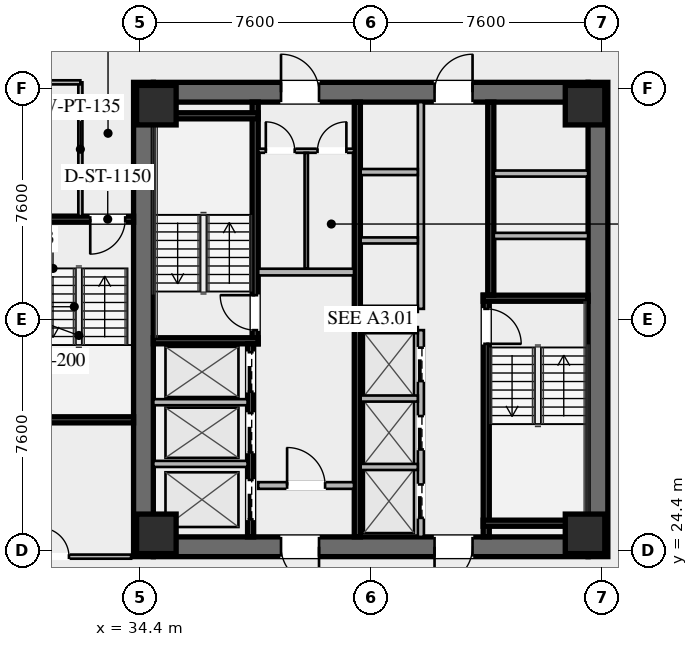
"""IFC4 building model, lengths in metres.
Left out: names, types, materials, properties, quantities, classifications, styles, units other than length and angle.
Written with IfcOpenShell. Run it as: python <this file> out.ifc"""

import sys

from ifc_helpers import new_model, si_unit, direction, frame, frame_2d, origin, origin_2d, place, context, subcontext, project, spatial, rectangle, hollow_rectangle, extrude, element, fill, save


model = new_model("IFC4")
c1 = context("Model", 3, precision=1e-05, world=origin(), true_north=direction((0.0, 1.0)))
c2 = subcontext(c1, "Body", "Model", "MODEL_VIEW")
j1 = project(units=[si_unit("LENGTHUNIT", "METRE"), si_unit("PLANEANGLEUNIT", "RADIAN")], contexts=[c1])
p1 = place(None, origin())
s1 = spatial("IfcSite", under=j1, at=p1, CompositionType="ELEMENT")
p2 = place(p1, origin())
s2 = spatial("IfcBuilding", under=s1, at=p2, CompositionType="ELEMENT")
p3 = place(p2, frame((0.0, 0.0, 67.2)))
s3 = spatial("IfcBuildingStorey", under=s2, at=p3, CompositionType="ELEMENT", Elevation=67.2)
for number, where, z_axis, x_axis in (
    (1, (34.525, 24.2, 0.0), (0.0, 0.0, 1.0), (0.0, 1.0, 0.0)),
    (2, (49.475, 39.8, 0.0), (0.0, 0.0, 1.0), (0.0, -1.0, 0.0)),
):
    element("IfcWall", number, at=place(p3, frame(where, z_axis=z_axis, x_axis=x_axis)), inside=s3, PredefinedType="SHEAR", context=c2, shape_type="SweptSolid", body=[
        extrude(rectangle(XDim=15.6, YDim=0.65, at=frame_2d((7.8, 0.0))), origin(), (0.0, 0.0, 1.0), 3.55),
    ])
p4 = place(p3, frame((49.15, 24.525, 0.0), z_axis=(0.0, 0.0, 1.0), x_axis=(-1.0, 0.0, 0.0)))
e3 = element("IfcWall", 3, at=p4, inside=s3, PredefinedType="SHEAR", context=c2, shape_type="SweptSolid", body=[
    extrude(rectangle(XDim=14.3, YDim=0.65, at=frame_2d((7.15, 0.0))), origin(), (0.0, 0.0, 1.0), 3.55),
])
p5 = place(p4, frame((8.85, 0.0, 0.0)))
e4 = element("IfcOpeningElement", 4, at=p5, cuts=e3, PredefinedType="OPENING", context=c2, shape_type="SweptSolid", body=[
    extrude(rectangle(XDim=1.25, YDim=2.25, at=frame_2d((0.625, 1.125))), frame((0.0, 0.335, 0.0), z_axis=(0.0, -1.0, 0.0), x_axis=(1.0, 0.0, 0.0)), (0.0, 0.0, 1.0), 0.67),
])
p6 = place(p4, frame((3.8, 0.0, 0.0)))
e5 = element("IfcOpeningElement", 5, at=p6, cuts=e3, PredefinedType="OPENING", context=c2, shape_type="SweptSolid", body=[
    extrude(rectangle(XDim=1.25, YDim=2.25, at=frame_2d((0.625, 1.125))), frame((0.0, 0.335, 0.0), z_axis=(0.0, -1.0, 0.0), x_axis=(1.0, 0.0, 0.0)), (0.0, 0.0, 1.0), 0.67),
])
p7 = place(p3, frame((34.85, 39.475, 0.0), z_axis=(0.0, 0.0, 1.0), x_axis=(1.0, 0.0, 0.0)))
e6 = element("IfcWall", 6, at=p7, inside=s3, PredefinedType="SHEAR", context=c2, shape_type="SweptSolid", body=[
    extrude(rectangle(XDim=14.3, YDim=0.65, at=frame_2d((7.15, 0.0))), origin(), (0.0, 0.0, 1.0), 3.55),
])
p8 = place(p7, frame((4.2, 0.0, 0.0)))
e7 = element("IfcOpeningElement", 7, at=p8, cuts=e6, PredefinedType="OPENING", context=c2, shape_type="SweptSolid", body=[
    extrude(rectangle(XDim=1.25, YDim=2.25, at=frame_2d((0.625, 1.125))), frame((0.0, 0.335, 0.0), z_axis=(0.0, -1.0, 0.0), x_axis=(1.0, 0.0, 0.0)), (0.0, 0.0, 1.0), 0.67),
])
p9 = place(p7, frame((9.25, 0.0, 0.0)))
e8 = element("IfcOpeningElement", 8, at=p9, cuts=e6, PredefinedType="OPENING", context=c2, shape_type="SweptSolid", body=[
    extrude(rectangle(XDim=1.25, YDim=2.25, at=frame_2d((0.625, 1.125))), frame((0.0, 0.335, 0.0), z_axis=(0.0, -1.0, 0.0), x_axis=(1.0, 0.0, 0.0)), (0.0, 0.0, 1.0), 0.67),
])
for number, where, z_axis, x_axis in (
    (9, (34.95, 24.95, 0.0), (0.0, 0.0, 1.0), (1.0, 0.0, 0.0)),
    (10, (49.05, 24.95, 0.0), (0.0, 0.0, 1.0), (1.0, 0.0, 0.0)),
    (11, (49.05, 39.05, 0.0), (0.0, 0.0, 1.0), (1.0, 0.0, 0.0)),
    (12, (34.95, 39.05, 0.0), (0.0, 0.0, 1.0), (1.0, 0.0, 0.0)),
):
    element("IfcColumn", number, at=place(p3, frame(where, z_axis=z_axis, x_axis=x_axis)), inside=s3, PredefinedType="COLUMN", context=c2, shape_type="SweptSolid", body=[
        extrude(hollow_rectangle(XDim=1.3, YDim=1.3, WallThickness=0.05, at=origin_2d()), origin(), (0.0, 0.0, 1.0), 3.35),
    ])
p10 = place(p3, frame((38.2, 31.2, 0.0), z_axis=(0.0, 0.0, 1.0), x_axis=(0.0, 1.0, 0.0)))
e13 = element("IfcWall", 13, at=p10, inside=s3, PredefinedType="SHEAR", context=c2, shape_type="SweptSolid", body=[
    extrude(rectangle(XDim=7.95, YDim=0.2, at=frame_2d((3.975, 0.0))), origin(), (0.0, 0.0, 1.0), 3.35),
])
p11 = place(p10, frame((0.45, 0.0, 0.0)))
e14 = element("IfcOpeningElement", 14, at=p11, cuts=e13, PredefinedType="OPENING", context=c2, shape_type="SweptSolid", body=[
    extrude(rectangle(XDim=1.15, YDim=2.2, at=frame_2d((0.575, 1.1))), frame((0.0, 0.11, 0.0), z_axis=(0.0, -1.0, 0.0), x_axis=(1.0, 0.0, 0.0)), (0.0, 0.0, 1.0), 0.22),
])
for number, where, z_axis, x_axis in (
    (15, (34.85, 31.3, 0.0), (0.0, 0.0, 1.0), (1.0, 0.0, 0.0)),
    (16, (34.85, 38.7, 0.0), (0.0, 0.0, 1.0), (1.0, 0.0, 0.0)),
):
    element("IfcWall", number, at=place(p3, frame(where, z_axis=z_axis, x_axis=x_axis)), inside=s3, PredefinedType="SHEAR", context=c2, shape_type="SweptSolid", body=[
        extrude(rectangle(XDim=3.45, YDim=0.2, at=frame_2d((1.725, 0.0))), origin(), (0.0, 0.0, 1.0), 3.35),
    ])
p12 = place(p3, frame((45.8, 32.8, 0.0), z_axis=(0.0, 0.0, 1.0), x_axis=(0.0, -1.0, 0.0)))
e17 = element("IfcWall", 17, at=p12, inside=s3, PredefinedType="SHEAR", context=c2, shape_type="SweptSolid", body=[
    extrude(rectangle(XDim=7.95, YDim=0.2, at=frame_2d((3.975, 0.0))), origin(), (0.0, 0.0, 1.0), 3.35),
])
p13 = place(p12, frame((0.45, 0.0, 0.0)))
e18 = element("IfcOpeningElement", 18, at=p13, cuts=e17, PredefinedType="OPENING", context=c2, shape_type="SweptSolid", body=[
    extrude(rectangle(XDim=1.15, YDim=2.2, at=frame_2d((0.575, 1.1))), frame((0.0, 0.11, 0.0), z_axis=(0.0, -1.0, 0.0), x_axis=(1.0, 0.0, 0.0)), (0.0, 0.0, 1.0), 0.22),
])
for number, where, z_axis, x_axis in (
    (19, (45.7, 32.7, 0.0), (0.0, 0.0, 1.0), (1.0, 0.0, 0.0)),
    (20, (45.7, 25.3, 0.0), (0.0, 0.0, 1.0), (1.0, 0.0, 0.0)),
):
    element("IfcWall", number, at=place(p3, frame(where, z_axis=z_axis, x_axis=x_axis)), inside=s3, PredefinedType="SHEAR", context=c2, shape_type="SweptSolid", body=[
        extrude(rectangle(XDim=3.45, YDim=0.2, at=frame_2d((1.725, 0.0))), origin(), (0.0, 0.0, 1.0), 3.35),
    ])
p14 = place(p3, frame((41.56, 24.85, 0.0), z_axis=(0.0, 0.0, 1.0), x_axis=(0.0, 1.0, 0.0)))
e21 = element("IfcWall", 21, at=p14, inside=s3, PredefinedType="SHEAR", context=c2, shape_type="SweptSolid", body=[
    extrude(rectangle(XDim=14.3, YDim=0.2, at=frame_2d((7.15, 0.0))), origin(), (0.0, 0.0, 1.0), 3.35),
])
p15 = place(p3, frame((38.3, 33.56, 0.0), z_axis=(0.0, 0.0, 1.0), x_axis=(1.0, 0.0, 0.0)))
e22 = element("IfcWall", 22, at=p15, inside=s3, PredefinedType="SOLIDWALL", context=c2, shape_type="SweptSolid", body=[
    extrude(rectangle(XDim=3.15, YDim=0.22, at=frame_2d((1.575, 0.0))), origin(), (0.0, 0.0, 1.0), 2.703),
])
p16 = place(p3, frame((38.3, 26.54, 0.0), z_axis=(0.0, 0.0, 1.0), x_axis=(1.0, 0.0, 0.0)))
e23 = element("IfcWall", 23, at=p16, inside=s3, PredefinedType="SOLIDWALL", context=c2, shape_type="SweptSolid", body=[
    extrude(rectangle(XDim=3.15, YDim=0.22, at=frame_2d((1.575, 0.0))), origin(), (0.0, 0.0, 1.0), 2.703),
])
p17 = place(p16, frame((0.95, 0.0, 0.0)))
e24 = element("IfcOpeningElement", 24, at=p17, cuts=e23, PredefinedType="OPENING", context=c2, shape_type="SweptSolid", body=[
    extrude(rectangle(XDim=1.25, YDim=2.25, at=frame_2d((0.625, 1.125))), frame((0.0, 0.12, 0.0), z_axis=(0.0, -1.0, 0.0), x_axis=(1.0, 0.0, 0.0)), (0.0, 0.0, 1.0), 0.24),
])
p18 = place(p3, frame((38.05, 24.85, 0.0), z_axis=(0.0, 0.0, 1.0), x_axis=(0.0, 1.0, 0.0)))
e25 = element("IfcWall", 25, at=p18, inside=s3, PredefinedType="SHEAR", context=c2, shape_type="SweptSolid", body=[
    extrude(rectangle(XDim=6.35, YDim=0.2, at=frame_2d((3.175, 0.0))), origin(), (0.0, 0.0, 1.0), 3.35),
])
p19 = place(p18, frame((4.775, 0.0, 0.0)))
e26 = element("IfcOpeningElement", 26, at=p19, cuts=e25, PredefinedType="OPENING", context=c2, shape_type="SweptSolid", body=[
    extrude(rectangle(XDim=1.3, YDim=2.25, at=frame_2d((0.65, 1.125))), frame((0.0, 0.11, 0.0), z_axis=(0.0, -1.0, 0.0), x_axis=(1.0, 0.0, 0.0)), (0.0, 0.0, 1.0), 0.22),
])
p20 = place(p18, frame((2.775, 0.0, 0.0)))
e27 = element("IfcOpeningElement", 27, at=p20, cuts=e25, PredefinedType="OPENING", context=c2, shape_type="SweptSolid", body=[
    extrude(rectangle(XDim=1.3, YDim=2.25, at=frame_2d((0.65, 1.125))), frame((0.0, 0.11, 0.0), z_axis=(0.0, -1.0, 0.0), x_axis=(1.0, 0.0, 0.0)), (0.0, 0.0, 1.0), 0.22),
])
p21 = place(p18, frame((0.575, 0.0, 0.0)))
e28 = element("IfcOpeningElement", 28, at=p21, cuts=e25, PredefinedType="OPENING", context=c2, shape_type="SweptSolid", body=[
    extrude(rectangle(XDim=1.3, YDim=2.25, at=frame_2d((0.65, 1.125))), frame((0.0, 0.11, 0.0), z_axis=(0.0, -1.0, 0.0), x_axis=(1.0, 0.0, 0.0)), (0.0, 0.0, 1.0), 0.22),
])
for number, where, z_axis, x_axis in (
    (29, (34.85, 27.25, 0.0), (0.0, 0.0, 1.0), (1.0, 0.0, 0.0)),
    (30, (34.85, 29.28, 0.0), (0.0, 0.0, 1.0), (1.0, 0.0, 0.0)),
):
    element("IfcWall", number, at=place(p3, frame(where, z_axis=z_axis, x_axis=x_axis)), inside=s3, PredefinedType="SOLIDWALL", context=c2, shape_type="SweptSolid", body=[
        extrude(rectangle(XDim=3.1, YDim=0.2, at=frame_2d((1.55, 0.0))), origin(), (0.0, 0.0, 1.0), 3.35),
    ])
p22 = place(p3, frame((45.95, 39.15, 0.0), z_axis=(0.0, 0.0, 1.0), x_axis=(0.0, -1.0, 0.0)))
e31 = element("IfcWall", 31, at=p22, inside=s3, PredefinedType="SHEAR", context=c2, shape_type="SweptSolid", body=[
    extrude(rectangle(XDim=6.35, YDim=0.2, at=frame_2d((3.175, 0.0))), origin(), (0.0, 0.0, 1.0), 3.35),
])
for number, where, z_axis, x_axis in (
    (32, (46.05, 34.75, 0.0), (0.0, 0.0, 1.0), (1.0, 0.0, 0.0)),
    (33, (46.05, 36.8, 0.0), (0.0, 0.0, 1.0), (1.0, 0.0, 0.0)),
):
    element("IfcWall", number, at=place(p3, frame(where, z_axis=z_axis, x_axis=x_axis)), inside=s3, PredefinedType="SOLIDWALL", context=c2, shape_type="SweptSolid", body=[
        extrude(rectangle(XDim=3.1, YDim=0.2, at=frame_2d((1.55, 0.0))), origin(), (0.0, 0.0, 1.0), 3.35),
    ])
p23 = place(p3, frame((38.3, 37.55, 0.0), z_axis=(0.0, 0.0, 1.0), x_axis=(1.0, 0.0, 0.0)))
e34 = element("IfcWall", 34, at=p23, inside=s3, PredefinedType="PARTITIONING", context=c2, shape_type="SweptSolid", body=[
    extrude(rectangle(XDim=3.15, YDim=0.135, at=frame_2d((1.575, 0.0))), origin(), (0.0, 0.0, 1.0), 2.703),
])
p24 = place(p23, frame((0.25, 0.0, 0.0)))
e35 = element("IfcOpeningElement", 35, at=p24, cuts=e34, PredefinedType="OPENING", context=c2, shape_type="SweptSolid", body=[
    extrude(rectangle(XDim=0.95, YDim=2.05, at=frame_2d((0.475, 1.025))), frame((0.0, 0.077, 0.0), z_axis=(0.0, -1.0, 0.0), x_axis=(1.0, 0.0, 0.0)), (0.0, 0.0, 1.0), 0.155),
])
p25 = place(p23, frame((1.95, 0.0, 0.0)))
e36 = element("IfcOpeningElement", 36, at=p25, cuts=e34, PredefinedType="OPENING", context=c2, shape_type="SweptSolid", body=[
    extrude(rectangle(XDim=0.95, YDim=2.05, at=frame_2d((0.475, 1.025))), frame((0.0, 0.077, 0.0), z_axis=(0.0, -1.0, 0.0), x_axis=(1.0, 0.0, 0.0)), (0.0, 0.0, 1.0), 0.155),
])
p26 = place(p3, frame((39.88, 33.68, 0.0), z_axis=(0.0, 0.0, 1.0), x_axis=(0.0, 1.0, 0.0)))
e37 = element("IfcWall", 37, at=p26, inside=s3, PredefinedType="PARTITIONING", context=c2, shape_type="SweptSolid", body=[
    extrude(rectangle(XDim=3.8, YDim=0.11, at=frame_2d((1.9, 0.0))), origin(), (0.0, 0.0, 1.0), 2.703),
])
p27 = place(p3, frame((43.65, 24.85, 0.0), z_axis=(0.0, 0.0, 1.0), x_axis=(0.0, 1.0, 0.0)))
e38 = element("IfcWall", 38, at=p27, inside=s3, PredefinedType="SOLIDWALL", context=c2, shape_type="SweptSolid", body=[
    extrude(rectangle(XDim=6.8, YDim=0.2, at=frame_2d((3.4, 0.0))), origin(), (0.0, 0.0, 1.0), 3.35),
])
p28 = place(p27, frame((0.625, 0.0, 0.0)))
e39 = element("IfcOpeningElement", 39, at=p28, cuts=e38, PredefinedType="OPENING", context=c2, shape_type="SweptSolid", body=[
    extrude(rectangle(XDim=1.1, YDim=2.2, at=frame_2d((0.55, 1.1))), frame((0.0, 0.11, 0.0), z_axis=(0.0, -1.0, 0.0), x_axis=(1.0, 0.0, 0.0)), (0.0, 0.0, 1.0), 0.22),
])
p29 = place(p27, frame((2.875, 0.0, 0.0)))
e40 = element("IfcOpeningElement", 40, at=p29, cuts=e38, PredefinedType="OPENING", context=c2, shape_type="SweptSolid", body=[
    extrude(rectangle(XDim=1.1, YDim=2.2, at=frame_2d((0.55, 1.1))), frame((0.0, 0.11, 0.0), z_axis=(0.0, -1.0, 0.0), x_axis=(1.0, 0.0, 0.0)), (0.0, 0.0, 1.0), 0.22),
])
p30 = place(p27, frame((5.125, 0.0, 0.0)))
e41 = element("IfcOpeningElement", 41, at=p30, cuts=e38, PredefinedType="OPENING", context=c2, shape_type="SweptSolid", body=[
    extrude(rectangle(XDim=1.1, YDim=2.2, at=frame_2d((0.55, 1.1))), frame((0.0, 0.11, 0.0), z_axis=(0.0, -1.0, 0.0), x_axis=(1.0, 0.0, 0.0)), (0.0, 0.0, 1.0), 0.22),
])
for number, where, z_axis, x_axis in (
    (42, (41.67, 27.15, 0.0), (0.0, 0.0, 1.0), (1.0, 0.0, 0.0)),
    (43, (41.67, 29.4, 0.0), (0.0, 0.0, 1.0), (1.0, 0.0, 0.0)),
    (44, (41.67, 31.65, 0.0), (0.0, 0.0, 1.0), (1.0, 0.0, 0.0)),
):
    element("IfcWall", number, at=place(p3, frame(where, z_axis=z_axis, x_axis=x_axis)), inside=s3, PredefinedType="SOLIDWALL", context=c2, shape_type="SweptSolid", body=[
        extrude(rectangle(XDim=1.88, YDim=0.2, at=frame_2d((0.94, 0.0))), origin(), (0.0, 0.0, 1.0), 3.35),
    ])
p31 = place(p3, frame((43.65, 32.35, 0.0), z_axis=(0.0, 0.0, 1.0), x_axis=(0.0, 1.0, 0.0)))
e45 = element("IfcWall", 45, at=p31, inside=s3, PredefinedType="SOLIDWALL", context=c2, shape_type="SweptSolid", body=[
    extrude(rectangle(XDim=6.8, YDim=0.2, at=frame_2d((3.4, 0.0))), origin(), (0.0, 0.0, 1.0), 3.35),
])
for number, where, z_axis, x_axis in (
    (46, (41.67, 32.35, 0.0), (0.0, 0.0, 1.0), (1.0, 0.0, 0.0)),
    (47, (41.67, 34.6, 0.0), (0.0, 0.0, 1.0), (1.0, 0.0, 0.0)),
    (48, (41.67, 36.85, 0.0), (0.0, 0.0, 1.0), (1.0, 0.0, 0.0)),
):
    element("IfcWall", number, at=place(p3, frame(where, z_axis=z_axis, x_axis=x_axis)), inside=s3, PredefinedType="SOLIDWALL", context=c2, shape_type="SweptSolid", body=[
        extrude(rectangle(XDim=1.88, YDim=0.2, at=frame_2d((0.94, 0.0))), origin(), (0.0, 0.0, 1.0), 3.35),
    ])
p32 = place(p3, frame((34.2, 35.3, 0.0), z_axis=(0.0, 0.0, 1.0), x_axis=(-1.0, 0.0, 0.0)))
e49 = element("IfcWall", 49, at=p32, inside=s3, PredefinedType="SHEAR", context=c2, shape_type="SweptSolid", body=[
    extrude(rectangle(XDim=3.4, YDim=0.2, at=frame_2d((1.7, 0.0))), origin(), (0.0, 0.0, 1.0), 3.35),
])
p33 = place(p32, frame((0.275, 0.0, 0.0)))
e50 = element("IfcOpeningElement", 50, at=p33, cuts=e49, PredefinedType="OPENING", context=c2, shape_type="SweptSolid", body=[
    extrude(rectangle(XDim=1.15, YDim=2.2, at=frame_2d((0.575, 1.1))), frame((0.0, 0.11, 0.0), z_axis=(0.0, -1.0, 0.0), x_axis=(1.0, 0.0, 0.0)), (0.0, 0.0, 1.0), 0.22),
])
p34 = place(p3, frame((30.8, 28.7, 0.0), z_axis=(0.0, 0.0, 1.0), x_axis=(1.0, 0.0, 0.0)))
e51 = element("IfcWall", 51, at=p34, inside=s3, PredefinedType="SHEAR", context=c2, shape_type="SweptSolid", body=[
    extrude(rectangle(XDim=3.4, YDim=0.2, at=frame_2d((1.7, 0.0))), origin(), (0.0, 0.0, 1.0), 3.35),
])
p35 = place(p3, frame((32.45, 35.4, 0.0), z_axis=(0.0, 0.0, 1.0), x_axis=(0.0, 1.0, 0.0)))
e52 = element("IfcWall", 52, at=p35, inside=s3, PredefinedType="PARTITIONING", context=c2, shape_type="SweptSolid", body=[
    extrude(rectangle(XDim=4.4, YDim=0.135, at=frame_2d((2.2, 0.0))), origin(), (0.0, 0.0, 1.0), 2.703),
])
p36 = place(p3, frame((32.45, 39.8, 0.0), z_axis=(0.0, 0.0, 1.0), x_axis=(-1.0, 0.0, 0.0)))
e53 = element("IfcWall", 53, at=p36, inside=s3, PredefinedType="PARTITIONING", context=c2, shape_type="SweptSolid", body=[
    extrude(rectangle(XDim=11.43, YDim=0.135, at=frame_2d((5.715, 0.0))), origin(), (0.0, 0.0, 1.0), 2.703),
])
p37 = place(p36, frame((4.89, 0.0, 0.0)))
e54 = element("IfcOpeningElement", 54, at=p37, cuts=e53, PredefinedType="OPENING", context=c2, shape_type="SweptSolid", body=[
    extrude(rectangle(XDim=0.95, YDim=2.05, at=frame_2d((0.475, 1.025))), frame((0.0, 0.077, 0.0), z_axis=(0.0, -1.0, 0.0), x_axis=(1.0, 0.0, 0.0)), (0.0, 0.0, 1.0), 0.155),
])
p38 = place(p3, frame((21.02, 24.2, 0.0), z_axis=(0.0, 0.0, 1.0), x_axis=(1.0, 0.0, 0.0)))
e55 = element("IfcWall", 55, at=p38, inside=s3, PredefinedType="PARTITIONING", context=c2, shape_type="SweptSolid", body=[
    extrude(rectangle(XDim=13.1, YDim=0.135, at=frame_2d((6.55, 0.0))), origin(), (0.0, 0.0, 1.0), 2.703),
])
p39 = place(p38, frame((10.105, 0.0, 0.0)))
e56 = element("IfcOpeningElement", 56, at=p39, cuts=e55, PredefinedType="OPENING", context=c2, shape_type="SweptSolid", body=[
    extrude(rectangle(XDim=0.95, YDim=2.05, at=frame_2d((0.475, 1.025))), frame((0.0, 0.077, 0.0), z_axis=(0.0, -1.0, 0.0), x_axis=(1.0, 0.0, 0.0)), (0.0, 0.0, 1.0), 0.155),
])
p40 = place(p8, origin())
e57 = element("IfcDoor", 57, at=p40, inside=s3, OperationType="SINGLE_SWING_LEFT", PredefinedType="DOOR", context=c2, shape_type="SweptSolid", body=[
    extrude(rectangle(XDim=1.25, YDim=2.25, at=frame_2d((0.625, 1.125))), frame((0.0, 0.025, 0.0), z_axis=(0.0, -1.0, 0.0), x_axis=(1.0, 0.0, 0.0)), (0.0, 0.0, 1.0), 0.05),
])
fill(e7, e57)
p41 = place(p9, origin())
e58 = element("IfcDoor", 58, at=p41, inside=s3, OperationType="SINGLE_SWING_RIGHT", PredefinedType="DOOR", context=c2, shape_type="SweptSolid", body=[
    extrude(rectangle(XDim=1.25, YDim=2.25, at=frame_2d((0.625, 1.125))), frame((0.0, 0.025, 0.0), z_axis=(0.0, -1.0, 0.0), x_axis=(1.0, 0.0, 0.0)), (0.0, 0.0, 1.0), 0.05),
])
fill(e8, e58)
p42 = place(p5, origin())
e59 = element("IfcDoor", 59, at=p42, inside=s3, OperationType="SINGLE_SWING_LEFT", PredefinedType="DOOR", context=c2, shape_type="SweptSolid", body=[
    extrude(rectangle(XDim=1.25, YDim=2.25, at=frame_2d((0.625, 1.125))), frame((0.0, 0.025, 0.0), z_axis=(0.0, -1.0, 0.0), x_axis=(1.0, 0.0, 0.0)), (0.0, 0.0, 1.0), 0.05),
])
fill(e4, e59)
p43 = place(p6, origin())
e60 = element("IfcDoor", 60, at=p43, inside=s3, OperationType="SINGLE_SWING_RIGHT", PredefinedType="DOOR", context=c2, shape_type="SweptSolid", body=[
    extrude(rectangle(XDim=1.25, YDim=2.25, at=frame_2d((0.625, 1.125))), frame((0.0, 0.025, 0.0), z_axis=(0.0, -1.0, 0.0), x_axis=(1.0, 0.0, 0.0)), (0.0, 0.0, 1.0), 0.05),
])
fill(e5, e60)
p44 = place(p11, origin())
e61 = element("IfcDoor", 61, at=p44, inside=s3, OperationType="SINGLE_SWING_RIGHT", PredefinedType="DOOR", context=c2, shape_type="SweptSolid", body=[
    extrude(rectangle(XDim=1.15, YDim=2.2, at=frame_2d((0.575, 1.1))), frame((0.0, 0.025, 0.0), z_axis=(0.0, -1.0, 0.0), x_axis=(1.0, 0.0, 0.0)), (0.0, 0.0, 1.0), 0.05),
])
fill(e14, e61)
p45 = place(p13, origin())
e62 = element("IfcDoor", 62, at=p45, inside=s3, OperationType="SINGLE_SWING_RIGHT", PredefinedType="DOOR", context=c2, shape_type="SweptSolid", body=[
    extrude(rectangle(XDim=1.15, YDim=2.2, at=frame_2d((0.575, 1.1))), frame((0.0, 0.025, 0.0), z_axis=(0.0, -1.0, 0.0), x_axis=(1.0, 0.0, 0.0)), (0.0, 0.0, 1.0), 0.05),
])
fill(e18, e62)
p46 = place(p17, origin())
e63 = element("IfcDoor", 63, at=p46, inside=s3, OperationType="SINGLE_SWING_LEFT", PredefinedType="DOOR", context=c2, shape_type="SweptSolid", body=[
    extrude(rectangle(XDim=1.25, YDim=2.25, at=frame_2d((0.625, 1.125))), frame((0.0, 0.025, 0.0), z_axis=(0.0, -1.0, 0.0), x_axis=(1.0, 0.0, 0.0)), (0.0, 0.0, 1.0), 0.05),
])
fill(e24, e63)
p47 = place(p24, origin())
e64 = element("IfcDoor", 64, at=p47, inside=s3, OperationType="SINGLE_SWING_LEFT", PredefinedType="DOOR", context=c2, shape_type="SweptSolid", body=[
    extrude(rectangle(XDim=0.95, YDim=2.05, at=frame_2d((0.475, 1.025))), frame((0.0, 0.025, 0.0), z_axis=(0.0, -1.0, 0.0), x_axis=(1.0, 0.0, 0.0)), (0.0, 0.0, 1.0), 0.05),
])
fill(e35, e64)
p48 = place(p25, origin())
e65 = element("IfcDoor", 65, at=p48, inside=s3, OperationType="SINGLE_SWING_RIGHT", PredefinedType="DOOR", context=c2, shape_type="SweptSolid", body=[
    extrude(rectangle(XDim=0.95, YDim=2.05, at=frame_2d((0.475, 1.025))), frame((0.0, 0.025, 0.0), z_axis=(0.0, -1.0, 0.0), x_axis=(1.0, 0.0, 0.0)), (0.0, 0.0, 1.0), 0.05),
])
fill(e36, e65)
p49 = place(p33, origin())
e66 = element("IfcDoor", 66, at=p49, inside=s3, OperationType="SINGLE_SWING_RIGHT", PredefinedType="DOOR", context=c2, shape_type="SweptSolid", body=[
    extrude(rectangle(XDim=1.15, YDim=2.2, at=frame_2d((0.575, 1.1))), frame((0.0, 0.025, 0.0), z_axis=(0.0, -1.0, 0.0), x_axis=(1.0, 0.0, 0.0)), (0.0, 0.0, 1.0), 0.05),
])
fill(e50, e66)
p50 = place(p39, origin())
e67 = element("IfcDoor", 67, at=p50, inside=s3, OperationType="SINGLE_SWING_LEFT", PredefinedType="DOOR", context=c2, shape_type="SweptSolid", body=[
    extrude(rectangle(XDim=0.95, YDim=2.05, at=frame_2d((0.475, 1.025))), frame((0.0, 0.025, 0.0), z_axis=(0.0, -1.0, 0.0), x_axis=(1.0, 0.0, 0.0)), (0.0, 0.0, 1.0), 0.05),
])
fill(e56, e67)
p51 = place(p19, origin())
e68 = element("IfcDoor", 68, at=p51, inside=s3, OperationType="SLIDING_TO_LEFT", PredefinedType="DOOR", context=c2, shape_type="SweptSolid", body=[
    extrude(rectangle(XDim=1.3, YDim=2.25, at=frame_2d((0.65, 1.125))), frame((0.0, 0.025, 0.0), z_axis=(0.0, -1.0, 0.0), x_axis=(1.0, 0.0, 0.0)), (0.0, 0.0, 1.0), 0.05),
])
fill(e26, e68)
p52 = place(p20, origin())
e69 = element("IfcDoor", 69, at=p52, inside=s3, OperationType="SLIDING_TO_LEFT", PredefinedType="DOOR", context=c2, shape_type="SweptSolid", body=[
    extrude(rectangle(XDim=1.3, YDim=2.25, at=frame_2d((0.65, 1.125))), frame((0.0, 0.025, 0.0), z_axis=(0.0, -1.0, 0.0), x_axis=(1.0, 0.0, 0.0)), (0.0, 0.0, 1.0), 0.05),
])
fill(e27, e69)
p53 = place(p21, origin())
e70 = element("IfcDoor", 70, at=p53, inside=s3, OperationType="SLIDING_TO_LEFT", PredefinedType="DOOR", context=c2, shape_type="SweptSolid", body=[
    extrude(rectangle(XDim=1.3, YDim=2.25, at=frame_2d((0.65, 1.125))), frame((0.0, 0.025, 0.0), z_axis=(0.0, -1.0, 0.0), x_axis=(1.0, 0.0, 0.0)), (0.0, 0.0, 1.0), 0.05),
])
fill(e28, e70)
p54 = place(p28, origin())
e71 = element("IfcDoor", 71, at=p54, inside=s3, OperationType="SLIDING_TO_LEFT", PredefinedType="DOOR", context=c2, shape_type="SweptSolid", body=[
    extrude(rectangle(XDim=1.1, YDim=2.2, at=frame_2d((0.55, 1.1))), frame((0.0, 0.025, 0.0), z_axis=(0.0, -1.0, 0.0), x_axis=(1.0, 0.0, 0.0)), (0.0, 0.0, 1.0), 0.05),
])
fill(e39, e71)
p55 = place(p29, origin())
e72 = element("IfcDoor", 72, at=p55, inside=s3, OperationType="SLIDING_TO_LEFT", PredefinedType="DOOR", context=c2, shape_type="SweptSolid", body=[
    extrude(rectangle(XDim=1.1, YDim=2.2, at=frame_2d((0.55, 1.1))), frame((0.0, 0.025, 0.0), z_axis=(0.0, -1.0, 0.0), x_axis=(1.0, 0.0, 0.0)), (0.0, 0.0, 1.0), 0.05),
])
fill(e40, e72)
p56 = place(p30, origin())
e73 = element("IfcDoor", 73, at=p56, inside=s3, OperationType="SLIDING_TO_LEFT", PredefinedType="DOOR", context=c2, shape_type="SweptSolid", body=[
    extrude(rectangle(XDim=1.1, YDim=2.2, at=frame_2d((0.55, 1.1))), frame((0.0, 0.025, 0.0), z_axis=(0.0, -1.0, 0.0), x_axis=(1.0, 0.0, 0.0)), (0.0, 0.0, 1.0), 0.05),
])
fill(e41, e73)
save(model, sys.argv[1])
